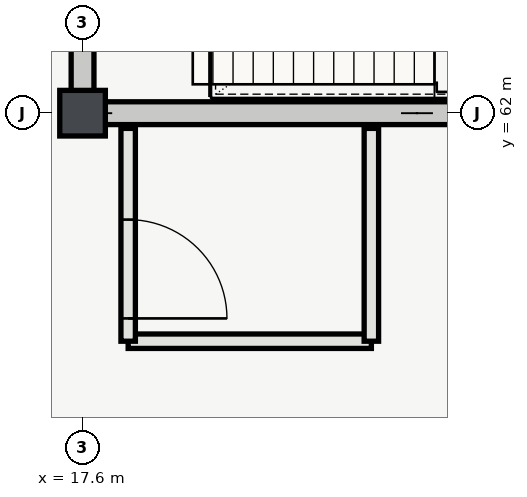
"""IFC4 building model, lengths in metres.
Left out: names, types, materials, properties, quantities, classifications, styles, units other than length and angle.
Written with IfcOpenShell. Run it as: python <this file> out.ifc"""

import sys

from ifc_helpers import new_model, si_unit, direction, frame, frame_2d, origin, origin_2d, place, context, subcontext, project, spatial, rectangle, extrude, element, fill, save


model = new_model("IFC4")
c1 = context("Model", 3, precision=1e-05, world=origin(), true_north=direction((0.0, 1.0)))
c2 = subcontext(c1, "Body", "Model", "MODEL_VIEW")
j1 = project(units=[si_unit("LENGTHUNIT", "METRE"), si_unit("PLANEANGLEUNIT", "RADIAN")], contexts=[c1])
p1 = place(None, origin())
s1 = spatial("IfcSite", under=j1, at=p1, CompositionType="ELEMENT")
p2 = place(p1, origin())
s2 = spatial("IfcBuilding", under=s1, at=p2, CompositionType="ELEMENT")
p3 = place(p2, frame((0.0, 0.0, 24.6)))
s3 = spatial("IfcBuildingStorey", under=s2, at=p3, CompositionType="ELEMENT", Elevation=24.6)
p4 = place(p3, frame((17.6, 62.0, 0.0), z_axis=(0.0, 0.0, 1.0), x_axis=(1.0, 0.0, 0.0)))
e1 = element("IfcColumn", 1, at=p4, inside=s3, PredefinedType="COLUMN", context=c2, shape_type="SweptSolid", body=[
    extrude(rectangle(XDim=0.6, YDim=0.6, at=origin_2d()), origin(), (0.0, 0.0, 1.0), 4.2),
])
p5 = place(p3, frame((17.45, 62.0, 0.0), z_axis=(0.0, 0.0, 1.0), x_axis=(1.0, 0.0, 0.0)))
e2 = element("IfcWall", 2, at=p5, inside=s3, PredefinedType="SHEAR", context=c2, shape_type="SweptSolid", body=[
    extrude(rectangle(XDim=9.1, YDim=0.3, at=frame_2d((4.55, 0.0))), origin(), (0.0, 0.0, 1.0), 3.92),
])
p6 = place(p3, frame((17.6, 62.15, 0.0), z_axis=(0.0, 0.0, 1.0), x_axis=(0.0, 1.0, 0.0)))
e3 = element("IfcWall", 3, at=p6, inside=s3, PredefinedType="SHEAR", context=c2, shape_type="SweptSolid", body=[
    extrude(rectangle(XDim=7.7, YDim=0.3, at=frame_2d((3.85, 0.0))), origin(), (0.0, 0.0, 1.0), 3.92),
])
p7 = place(p6, frame((1.675, 0.0, 0.0)))
e4 = element("IfcOpeningElement", 4, at=p7, cuts=e3, PredefinedType="OPENING", context=c2, shape_type="SweptSolid", body=[
    extrude(rectangle(XDim=1.35, YDim=2.2, at=frame_2d((0.675, 1.1))), frame((0.0, 0.16, 0.0), z_axis=(0.0, -1.0, 0.0), x_axis=(1.0, 0.0, 0.0)), (0.0, 0.0, 1.0), 0.32),
])
p8 = place(p6, frame((5.7, 0.0, 0.0)))
e5 = element("IfcOpeningElement", 5, at=p8, cuts=e3, PredefinedType="OPENING", context=c2, shape_type="SweptSolid", body=[
    extrude(rectangle(XDim=1.0, YDim=2.15, at=frame_2d((0.5, 1.075))), frame((0.0, 0.16, 0.0), z_axis=(0.0, -1.0, 0.0), x_axis=(1.0, 0.0, 0.0)), (0.0, 0.0, 1.0), 0.32),
])
p9 = place(p3, frame((18.2, 59.0, 0.0), z_axis=(0.0, 0.0, 1.0), x_axis=(1.0, 0.0, 0.0)))
e6 = element("IfcWall", 6, at=p9, inside=s3, PredefinedType="PARTITIONING", context=c2, shape_type="SweptSolid", body=[
    extrude(rectangle(XDim=3.2, YDim=0.19, at=frame_2d((1.6, 0.0))), origin(), (0.0, 0.0, 1.0), 3.92),
])
p10 = place(p3, frame((18.2, 61.8, 0.0), z_axis=(0.0, 0.0, 1.0), x_axis=(0.0, -1.0, 0.0)))
e7 = element("IfcWall", 7, at=p10, inside=s3, PredefinedType="PARTITIONING", context=c2, shape_type="SweptSolid", body=[
    extrude(rectangle(XDim=2.8, YDim=0.19, at=frame_2d((1.4, 0.0))), origin(), (0.0, 0.0, 1.0), 3.92),
])
p11 = place(p10, frame((1.2, 0.0, 0.0)))
e8 = element("IfcOpeningElement", 8, at=p11, cuts=e7, PredefinedType="OPENING", context=c2, shape_type="SweptSolid", body=[
    extrude(rectangle(XDim=1.3, YDim=2.2, at=frame_2d((0.65, 1.1))), frame((0.0, 0.105, 0.0), z_axis=(0.0, -1.0, 0.0), x_axis=(1.0, 0.0, 0.0)), (0.0, 0.0, 1.0), 0.21),
])
p12 = place(p3, frame((21.4, 59.0, 0.0), z_axis=(0.0, 0.0, 1.0), x_axis=(0.0, 1.0, 0.0)))
e9 = element("IfcWall", 9, at=p12, inside=s3, PredefinedType="PARTITIONING", context=c2, shape_type="SweptSolid", body=[
    extrude(rectangle(XDim=2.8, YDim=0.19, at=frame_2d((1.4, 0.0))), origin(), (0.0, 0.0, 1.0), 3.92),
])
p13 = place(p11, origin())
e10 = element("IfcDoor", 10, at=p13, inside=s3, OperationType="SINGLE_SWING_RIGHT", PredefinedType="DOOR", context=c2, shape_type="SweptSolid", body=[
    extrude(rectangle(XDim=1.3, YDim=2.2, at=frame_2d((0.65, 1.1))), frame((0.0, 0.025, 0.0), z_axis=(0.0, -1.0, 0.0), x_axis=(1.0, 0.0, 0.0)), (0.0, 0.0, 1.0), 0.05),
])
fill(e8, e10)
save(model, sys.argv[1])
